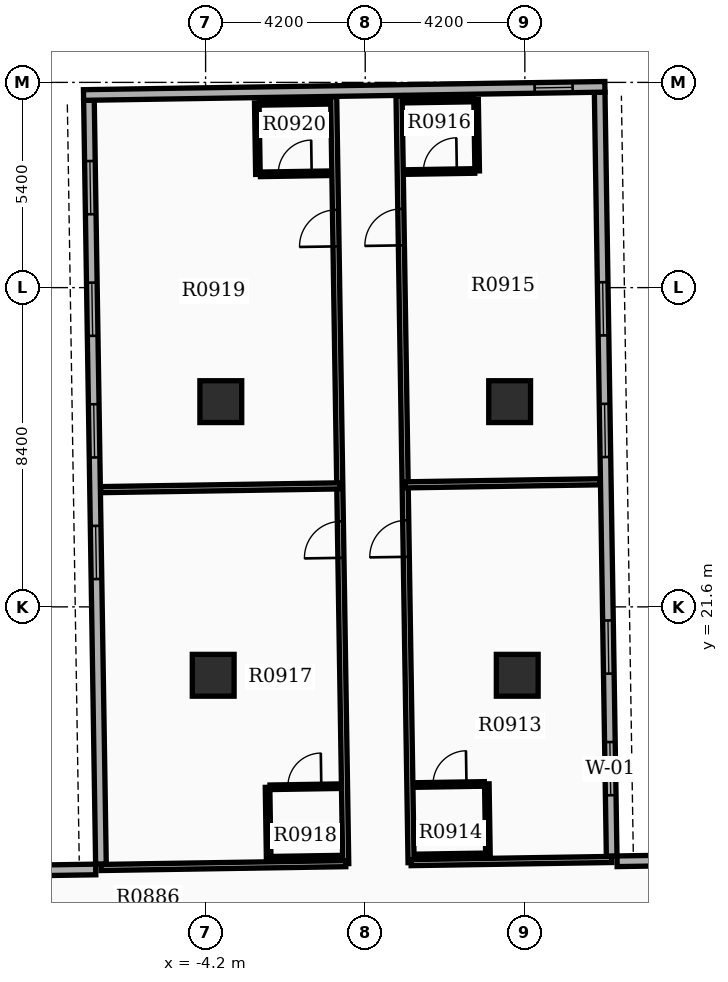
"""IFC4 building model, lengths in metres.
Left out: names, types, materials, properties, quantities, classifications, styles, units other than length and angle.
Written with IfcOpenShell. Run it as: python <this file> out.ifc"""

import sys

from ifc_helpers import new_model, si_unit, direction, frame, frame_2d, origin, origin_2d, place, context, subcontext, project, spatial, rectangle, extrude, element, fill, save


model = new_model("IFC4")
c1 = context("Model", 3, precision=1e-05, world=origin(), true_north=direction((0.0, 1.0)))
c2 = subcontext(c1, "Body", "Model", "MODEL_VIEW")
j1 = project(units=[si_unit("LENGTHUNIT", "METRE"), si_unit("PLANEANGLEUNIT", "RADIAN")], contexts=[c1])
p1 = place(None, origin())
s1 = spatial("IfcSite", under=j1, at=p1, CompositionType="ELEMENT")
p2 = place(p1, origin())
s2 = spatial("IfcBuilding", under=s1, at=p2, CompositionType="ELEMENT")
p3 = place(p2, frame((0.0, 0.0, 60.0)))
s3 = spatial("IfcBuildingStorey", under=s2, at=p3, CompositionType="ELEMENT", Elevation=60.0)
for number, where, z_axis, x_axis in (
    (1, (-4.0, 19.8, 0.0), (0.0, 0.0, 1.0), (1.0, 0.0, 0.0)),
    (2, (4.0, 19.8, 0.0), (0.0, 0.0, 1.0), (1.0, 0.0, 0.0)),
    (3, (-3.8, 27.0, 0.0), (0.0, 0.0, 1.0), (1.0, 0.0, 0.0)),
    (4, (3.8, 27.0, 0.0), (0.0, 0.0, 1.0), (1.0, 0.0, 0.0)),
):
    element("IfcColumn", number, at=place(p3, frame(where, z_axis=z_axis, x_axis=x_axis)), inside=s3, PredefinedType="COLUMN", context=c2, shape_type="SweptSolid", body=[
        extrude(rectangle(XDim=1.1, YDim=1.1, at=origin_2d()), origin(), (0.0, 0.0, 1.0), 3.9),
    ])
p4 = place(p3, frame((6.485, 15.044, 0.0), z_axis=(0.0, 0.0, 1.0), x_axis=(-0.01571739401, 0.999876474133, 0.0)))
e5 = element("IfcWall", 5, at=p4, inside=s3, PredefinedType="STANDARD", context=c2, shape_type="SweptSolid", body=[
    extrude(rectangle(XDim=20.1, YDim=0.28, at=frame_2d((10.05, 0.0))), origin(), (0.0, 0.0, 1.0), 2.91),
])
p5 = place(p4, frame((1.6, 0.0, 0.8)))
e6 = element("IfcOpeningElement", 6, at=p5, cuts=e5, PredefinedType="OPENING", context=c2, shape_type="SweptSolid", body=[
    extrude(rectangle(XDim=1.4, YDim=1.6, at=frame_2d((0.7, 0.8))), frame((0.0, 0.15, 0.0), z_axis=(0.0, -1.0, 0.0), x_axis=(1.0, 0.0, 0.0)), (0.0, 0.0, 1.0), 0.3),
])
p6 = place(p4, frame((4.8, 0.0, 0.8)))
e7 = element("IfcOpeningElement", 7, at=p6, cuts=e5, PredefinedType="OPENING", context=c2, shape_type="SweptSolid", body=[
    extrude(rectangle(XDim=1.4, YDim=1.6, at=frame_2d((0.7, 0.8))), frame((0.0, 0.15, 0.0), z_axis=(0.0, -1.0, 0.0), x_axis=(1.0, 0.0, 0.0)), (0.0, 0.0, 1.0), 0.3),
])
p7 = place(p4, frame((10.5, 0.0, 0.8)))
e8 = element("IfcOpeningElement", 8, at=p7, cuts=e5, PredefinedType="OPENING", context=c2, shape_type="SweptSolid", body=[
    extrude(rectangle(XDim=1.4, YDim=1.6, at=frame_2d((0.7, 0.8))), frame((0.0, 0.15, 0.0), z_axis=(0.0, -1.0, 0.0), x_axis=(1.0, 0.0, 0.0)), (0.0, 0.0, 1.0), 0.3),
])
p8 = place(p4, frame((13.7, 0.0, 0.8)))
e9 = element("IfcOpeningElement", 9, at=p8, cuts=e5, PredefinedType="OPENING", context=c2, shape_type="SweptSolid", body=[
    extrude(rectangle(XDim=1.4, YDim=1.6, at=frame_2d((0.7, 0.8))), frame((0.0, 0.15, 0.0), z_axis=(0.0, -1.0, 0.0), x_axis=(1.0, 0.0, 0.0)), (0.0, 0.0, 1.0), 0.3),
])
p9 = place(p3, frame((-7.27, 34.93, 0.0), z_axis=(0.0, 0.0, 1.0), x_axis=(0.015705059908, -0.999876667941, 0.0)))
e10 = element("IfcWall", 10, at=p9, inside=s3, PredefinedType="STANDARD", context=c2, shape_type="SweptSolid", body=[
    extrude(rectangle(XDim=20.1, YDim=0.28, at=frame_2d((10.05, 0.0))), origin(), (0.0, 0.0, 1.0), 2.91),
])
p10 = place(p9, frame((1.6, 0.0, 0.8)))
e11 = element("IfcOpeningElement", 11, at=p10, cuts=e10, PredefinedType="OPENING", context=c2, shape_type="SweptSolid", body=[
    extrude(rectangle(XDim=1.4, YDim=1.6, at=frame_2d((0.7, 0.8))), frame((0.0, 0.15, 0.0), z_axis=(0.0, -1.0, 0.0), x_axis=(1.0, 0.0, 0.0)), (0.0, 0.0, 1.0), 0.3),
])
p11 = place(p9, frame((4.8, 0.0, 0.8)))
e12 = element("IfcOpeningElement", 12, at=p11, cuts=e10, PredefinedType="OPENING", context=c2, shape_type="SweptSolid", body=[
    extrude(rectangle(XDim=1.4, YDim=1.6, at=frame_2d((0.7, 0.8))), frame((0.0, 0.15, 0.0), z_axis=(0.0, -1.0, 0.0), x_axis=(1.0, 0.0, 0.0)), (0.0, 0.0, 1.0), 0.3),
])
p12 = place(p9, frame((8.0, 0.0, 0.8)))
e13 = element("IfcOpeningElement", 13, at=p12, cuts=e10, PredefinedType="OPENING", context=c2, shape_type="SweptSolid", body=[
    extrude(rectangle(XDim=1.4, YDim=1.6, at=frame_2d((0.7, 0.8))), frame((0.0, 0.15, 0.0), z_axis=(0.0, -1.0, 0.0), x_axis=(1.0, 0.0, 0.0)), (0.0, 0.0, 1.0), 0.3),
])
p13 = place(p9, frame((11.2, 0.0, 0.8)))
e14 = element("IfcOpeningElement", 14, at=p13, cuts=e10, PredefinedType="OPENING", context=c2, shape_type="SweptSolid", body=[
    extrude(rectangle(XDim=1.4, YDim=1.6, at=frame_2d((0.7, 0.8))), frame((0.0, 0.15, 0.0), z_axis=(0.0, -1.0, 0.0), x_axis=(1.0, 0.0, 0.0)), (0.0, 0.0, 1.0), 0.3),
])
p14 = place(p3, frame((6.307, 35.283, 0.0), z_axis=(0.0, 0.0, 1.0), x_axis=(-0.999876549481, -0.015712599986, 0.0)))
e15 = element("IfcWall", 15, at=p14, inside=s3, PredefinedType="STANDARD", context=c2, shape_type="SweptSolid", body=[
    extrude(rectangle(XDim=13.72, YDim=0.28, at=frame_2d((6.86, 0.0))), origin(), (0.0, 0.0, 1.0), 2.91),
])
p15 = place(p14, frame((0.85, 0.0, 0.85)))
e16 = element("IfcOpeningElement", 16, at=p15, cuts=e15, PredefinedType="OPENING", context=c2, shape_type="SweptSolid", body=[
    extrude(rectangle(XDim=1.0, YDim=1.5, at=frame_2d((0.5, 0.75))), frame((0.0, 0.15, 0.0), z_axis=(0.0, -1.0, 0.0), x_axis=(1.0, 0.0, 0.0)), (0.0, 0.0, 1.0), 0.3),
])
p16 = place(p3, frame((12.926, 15.005, 0.0), z_axis=(0.0, 0.0, 1.0), x_axis=(-0.999876823822, -0.015695132501, 0.0)))
e17 = element("IfcWall", 17, at=p16, inside=s3, PredefinedType="STANDARD", context=c2, shape_type="SweptSolid", body=[
    extrude(rectangle(XDim=6.3, YDim=0.28, at=frame_2d((3.15, 0.0))), origin(), (0.0, 0.0, 1.0), 2.91),
])
p17 = place(p3, frame((-13.391, 14.592, 0.0), z_axis=(0.0, 0.0, 1.0), x_axis=(0.999876833368, 0.015694524359, 0.0)))
e18 = element("IfcWall", 18, at=p17, inside=s3, PredefinedType="STANDARD", context=c2, shape_type="SweptSolid", body=[
    extrude(rectangle(XDim=6.3, YDim=0.28, at=frame_2d((3.15, 0.0))), origin(), (0.0, 0.0, 1.0), 2.91),
])
p18 = place(p3, frame((1.207, 14.871, 0.0), z_axis=(0.0, 0.0, 1.0), x_axis=(-0.015713987169, 0.999876527681, 0.0)))
e19 = element("IfcWall", 19, at=p18, inside=s3, PredefinedType="PARTITIONING", context=c2, shape_type="SweptSolid", body=[
    extrude(rectangle(XDim=20.182, YDim=0.16, at=frame_2d((10.091, 0.0))), origin(), (0.0, 0.0, 1.0), 2.9),
])
p19 = place(p18, frame((8.047, 0.0, 0.0)))
e20 = element("IfcOpeningElement", 20, at=p19, cuts=e19, PredefinedType="OPENING", context=c2, shape_type="SweptSolid", body=[
    extrude(rectangle(XDim=0.96, YDim=2.15, at=frame_2d((0.48, 1.075))), frame((0.0, 0.09, 0.0), z_axis=(0.0, -1.0, 0.0), x_axis=(1.0, 0.0, 0.0)), (0.0, 0.0, 1.0), 0.18),
])
p20 = place(p18, frame((16.243, 0.0, 0.0)))
e21 = element("IfcOpeningElement", 21, at=p20, cuts=e19, PredefinedType="OPENING", context=c2, shape_type="SweptSolid", body=[
    extrude(rectangle(XDim=0.96, YDim=2.15, at=frame_2d((0.48, 1.075))), frame((0.0, 0.09, 0.0), z_axis=(0.0, -1.0, 0.0), x_axis=(1.0, 0.0, 0.0)), (0.0, 0.0, 1.0), 0.18),
])
p21 = place(p3, frame((1.207, 14.871, 0.0), z_axis=(0.0, 0.0, 1.0), x_axis=(0.999877138082, 0.015675099418, 0.0)))
e22 = element("IfcWall", 22, at=p21, inside=s3, PredefinedType="PARTITIONING", context=c2, shape_type="SweptSolid", body=[
    extrude(rectangle(XDim=5.28, YDim=0.16, at=frame_2d((2.64, 0.0))), origin(), (0.0, 0.0, 1.0), 2.9),
])
p22 = place(p3, frame((1.05, 24.811, 0.0), z_axis=(0.0, 0.0, 1.0), x_axis=(0.99987677651, 0.01569814626, 0.0)))
e23 = element("IfcWall", 23, at=p22, inside=s3, PredefinedType="PARTITIONING", context=c2, shape_type="SweptSolid", body=[
    extrude(rectangle(XDim=5.132, YDim=0.16, at=frame_2d((2.566, 0.0))), origin(), (0.0, 0.0, 1.0), 2.9),
])
p23 = place(p3, frame((1.314, 16.913, 0.0), z_axis=(0.0, 0.0, 1.0), x_axis=(0.999874722342, 0.015828443418, 0.0)))
e24 = element("IfcWall", 24, at=p23, inside=s3, PredefinedType="PARTITIONING", context=c2, shape_type="SweptSolid", body=[
    extrude(rectangle(XDim=1.82, YDim=0.12, at=frame_2d((0.91, 0.0))), origin(), (0.0, 0.0, 1.0), 2.9),
])
p24 = place(p23, frame((0.47, 0.0, 0.0)))
e25 = element("IfcOpeningElement", 25, at=p24, cuts=e24, PredefinedType="OPENING", context=c2, shape_type="SweptSolid", body=[
    extrude(rectangle(XDim=0.88, YDim=2.1, at=frame_2d((0.44, 1.05))), frame((0.0, 0.07, 0.0), z_axis=(0.0, -1.0, 0.0), x_axis=(1.0, 0.0, 0.0)), (0.0, 0.0, 1.0), 0.14),
])
p25 = place(p3, frame((1.344, 15.033, 0.0), z_axis=(0.0, 0.0, 1.0), x_axis=(0.999876836305, 0.015694337248, 0.0)))
e26 = element("IfcWall", 26, at=p25, inside=s3, PredefinedType="PARTITIONING", context=c2, shape_type="SweptSolid", body=[
    extrude(rectangle(XDim=1.82, YDim=0.12, at=frame_2d((0.91, 0.0))), origin(), (0.0, 0.0, 1.0), 2.9),
])
p26 = place(p3, frame((3.229, 15.062, 0.0), z_axis=(0.0, 0.0, 1.0), x_axis=(-0.01571234584, 0.999876553475, 0.0)))
e27 = element("IfcWall", 27, at=p26, inside=s3, PredefinedType="PARTITIONING", context=c2, shape_type="SweptSolid", body=[
    extrude(rectangle(XDim=1.88, YDim=0.12, at=frame_2d((0.94, 0.0))), origin(), (0.0, 0.0, 1.0), 2.9),
])
p27 = place(p3, frame((1.061, 33.041, 0.0), z_axis=(0.0, 0.0, 1.0), x_axis=(0.999876836305, 0.015694337248, 0.0)))
e28 = element("IfcWall", 28, at=p27, inside=s3, PredefinedType="PARTITIONING", context=c2, shape_type="SweptSolid", body=[
    extrude(rectangle(XDim=1.82, YDim=0.12, at=frame_2d((0.91, 0.0))), origin(), (0.0, 0.0, 1.0), 2.9),
])
p28 = place(p27, frame((0.47, 0.0, 0.0)))
e29 = element("IfcOpeningElement", 29, at=p28, cuts=e28, PredefinedType="OPENING", context=c2, shape_type="SweptSolid", body=[
    extrude(rectangle(XDim=0.88, YDim=2.1, at=frame_2d((0.44, 1.05))), frame((0.0, 0.07, 0.0), z_axis=(0.0, -1.0, 0.0), x_axis=(1.0, 0.0, 0.0)), (0.0, 0.0, 1.0), 0.14),
])
p29 = place(p3, frame((1.031, 34.92, 0.0), z_axis=(0.0, 0.0, 1.0), x_axis=(0.999874722342, 0.015828443418, 0.0)))
e30 = element("IfcWall", 30, at=p29, inside=s3, PredefinedType="PARTITIONING", context=c2, shape_type="SweptSolid", body=[
    extrude(rectangle(XDim=1.82, YDim=0.12, at=frame_2d((0.91, 0.0))), origin(), (0.0, 0.0, 1.0), 2.9),
])
p30 = place(p3, frame((2.946, 33.07, 0.0), z_axis=(0.0, 0.0, 1.0), x_axis=(-0.015582523404, 0.999878585111, 0.0)))
e31 = element("IfcWall", 31, at=p30, inside=s3, PredefinedType="PARTITIONING", context=c2, shape_type="SweptSolid", body=[
    extrude(rectangle(XDim=1.88, YDim=0.12, at=frame_2d((0.94, 0.0))), origin(), (0.0, 0.0, 1.0), 2.9),
])
p31 = place(p3, frame((-0.513, 14.844, 0.0), z_axis=(0.0, 0.0, 1.0), x_axis=(-0.015701893165, 0.999876717676, 0.0)))
e32 = element("IfcWall", 32, at=p31, inside=s3, PredefinedType="PARTITIONING", context=c2, shape_type="SweptSolid", body=[
    extrude(rectangle(XDim=20.182, YDim=0.16, at=frame_2d((10.091, 0.0))), origin(), (0.0, 0.0, 1.0), 2.9),
])
p32 = place(p31, frame((8.047, 0.0, 0.0)))
e33 = element("IfcOpeningElement", 33, at=p32, cuts=e32, PredefinedType="OPENING", context=c2, shape_type="SweptSolid", body=[
    extrude(rectangle(XDim=0.96, YDim=2.15, at=frame_2d((0.48, 1.075))), frame((0.0, 0.09, 0.0), z_axis=(0.0, -1.0, 0.0), x_axis=(1.0, 0.0, 0.0)), (0.0, 0.0, 1.0), 0.18),
])
p33 = place(p31, frame((16.243, 0.0, 0.0)))
e34 = element("IfcOpeningElement", 34, at=p33, cuts=e32, PredefinedType="OPENING", context=c2, shape_type="SweptSolid", body=[
    extrude(rectangle(XDim=0.96, YDim=2.15, at=frame_2d((0.48, 1.075))), frame((0.0, 0.09, 0.0), z_axis=(0.0, -1.0, 0.0), x_axis=(1.0, 0.0, 0.0)), (0.0, 0.0, 1.0), 0.18),
])
p34 = place(p3, frame((-0.513, 14.844, 0.0), z_axis=(0.0, 0.0, 1.0), x_axis=(-0.99987682984, -0.015694749102, 0.0)))
e35 = element("IfcWall", 35, at=p34, inside=s3, PredefinedType="PARTITIONING", context=c2, shape_type="SweptSolid", body=[
    extrude(rectangle(XDim=6.44, YDim=0.16, at=frame_2d((3.22, 0.0))), origin(), (0.0, 0.0, 1.0), 2.9),
])
p35 = place(p3, frame((-0.669, 24.783, 0.0), z_axis=(0.0, 0.0, 1.0), x_axis=(-0.999877126691, -0.015675825961, 0.0)))
e36 = element("IfcWall", 36, at=p35, inside=s3, PredefinedType="PARTITIONING", context=c2, shape_type="SweptSolid", body=[
    extrude(rectangle(XDim=6.292, YDim=0.16, at=frame_2d((3.146, 0.0))), origin(), (0.0, 0.0, 1.0), 2.9),
])
p36 = place(p3, frame((-2.505, 16.853, 0.0), z_axis=(0.0, 0.0, 1.0), x_axis=(0.999876803258, 0.015696442504, 0.0)))
e37 = element("IfcWall", 37, at=p36, inside=s3, PredefinedType="PARTITIONING", context=c2, shape_type="SweptSolid", body=[
    extrude(rectangle(XDim=1.82, YDim=0.12, at=frame_2d((0.91, 0.0))), origin(), (0.0, 0.0, 1.0), 2.9),
])
p37 = place(p36, frame((0.47, 0.0, 0.0)))
e38 = element("IfcOpeningElement", 38, at=p37, cuts=e37, PredefinedType="OPENING", context=c2, shape_type="SweptSolid", body=[
    extrude(rectangle(XDim=0.88, YDim=2.1, at=frame_2d((0.44, 1.05))), frame((0.0, 0.07, 0.0), z_axis=(0.0, -1.0, 0.0), x_axis=(1.0, 0.0, 0.0)), (0.0, 0.0, 1.0), 0.14),
])
p38 = place(p3, frame((-2.476, 14.973, 0.0), z_axis=(0.0, 0.0, 1.0), x_axis=(0.999874722342, 0.015828443418, 0.0)))
e39 = element("IfcWall", 39, at=p38, inside=s3, PredefinedType="PARTITIONING", context=c2, shape_type="SweptSolid", body=[
    extrude(rectangle(XDim=1.82, YDim=0.12, at=frame_2d((0.91, 0.0))), origin(), (0.0, 0.0, 1.0), 2.9),
])
p39 = place(p3, frame((-2.541, 14.972, 0.0), z_axis=(0.0, 0.0, 1.0), x_axis=(-0.01571234584, 0.999876553475, 0.0)))
e40 = element("IfcWall", 40, at=p39, inside=s3, PredefinedType="PARTITIONING", context=c2, shape_type="SweptSolid", body=[
    extrude(rectangle(XDim=1.88, YDim=0.12, at=frame_2d((0.94, 0.0))), origin(), (0.0, 0.0, 1.0), 2.9),
])
p40 = place(p3, frame((-2.758, 32.981, 0.0), z_axis=(0.0, 0.0, 1.0), x_axis=(0.999876803258, 0.015696442504, 0.0)))
e41 = element("IfcWall", 41, at=p40, inside=s3, PredefinedType="PARTITIONING", context=c2, shape_type="SweptSolid", body=[
    extrude(rectangle(XDim=1.82, YDim=0.12, at=frame_2d((0.91, 0.0))), origin(), (0.0, 0.0, 1.0), 2.9),
])
p41 = place(p40, frame((0.47, 0.0, 0.0)))
e42 = element("IfcOpeningElement", 42, at=p41, cuts=e41, PredefinedType="OPENING", context=c2, shape_type="SweptSolid", body=[
    extrude(rectangle(XDim=0.88, YDim=2.1, at=frame_2d((0.44, 1.05))), frame((0.0, 0.07, 0.0), z_axis=(0.0, -1.0, 0.0), x_axis=(1.0, 0.0, 0.0)), (0.0, 0.0, 1.0), 0.14),
])
p42 = place(p3, frame((-2.788, 34.861, 0.0), z_axis=(0.0, 0.0, 1.0), x_axis=(0.999876836305, 0.015694337248, 0.0)))
e43 = element("IfcWall", 43, at=p42, inside=s3, PredefinedType="PARTITIONING", context=c2, shape_type="SweptSolid", body=[
    extrude(rectangle(XDim=1.82, YDim=0.12, at=frame_2d((0.91, 0.0))), origin(), (0.0, 0.0, 1.0), 2.9),
])
p43 = place(p3, frame((-2.823, 32.98, 0.0), z_axis=(0.0, 0.0, 1.0), x_axis=(-0.015582523404, 0.999878585111, 0.0)))
e44 = element("IfcWall", 44, at=p43, inside=s3, PredefinedType="PARTITIONING", context=c2, shape_type="SweptSolid", body=[
    extrude(rectangle(XDim=1.88, YDim=0.12, at=frame_2d((0.94, 0.0))), origin(), (0.0, 0.0, 1.0), 2.9),
])
p44 = place(p5, origin())
e45 = element("IfcWindow", 45, at=p44, inside=s3, PartitioningType="SINGLE_PANEL", PredefinedType="WINDOW", context=c2, shape_type="SweptSolid", body=[
    extrude(rectangle(XDim=1.4, YDim=1.6, at=frame_2d((0.7, 0.8))), frame((0.0, 0.03, 0.0), z_axis=(0.0, -1.0, 0.0), x_axis=(1.0, 0.0, 0.0)), (0.0, 0.0, 1.0), 0.06),
])
fill(e6, e45)
p45 = place(p6, origin())
e46 = element("IfcWindow", 46, at=p45, inside=s3, PartitioningType="SINGLE_PANEL", PredefinedType="WINDOW", context=c2, shape_type="SweptSolid", body=[
    extrude(rectangle(XDim=1.4, YDim=1.6, at=frame_2d((0.7, 0.8))), frame((0.0, 0.03, 0.0), z_axis=(0.0, -1.0, 0.0), x_axis=(1.0, 0.0, 0.0)), (0.0, 0.0, 1.0), 0.06),
])
fill(e7, e46)
p46 = place(p7, origin())
e47 = element("IfcWindow", 47, at=p46, inside=s3, PartitioningType="SINGLE_PANEL", PredefinedType="WINDOW", context=c2, shape_type="SweptSolid", body=[
    extrude(rectangle(XDim=1.4, YDim=1.6, at=frame_2d((0.7, 0.8))), frame((0.0, 0.03, 0.0), z_axis=(0.0, -1.0, 0.0), x_axis=(1.0, 0.0, 0.0)), (0.0, 0.0, 1.0), 0.06),
])
fill(e8, e47)
p47 = place(p8, origin())
e48 = element("IfcWindow", 48, at=p47, inside=s3, PartitioningType="SINGLE_PANEL", PredefinedType="WINDOW", context=c2, shape_type="SweptSolid", body=[
    extrude(rectangle(XDim=1.4, YDim=1.6, at=frame_2d((0.7, 0.8))), frame((0.0, 0.03, 0.0), z_axis=(0.0, -1.0, 0.0), x_axis=(1.0, 0.0, 0.0)), (0.0, 0.0, 1.0), 0.06),
])
fill(e9, e48)
p48 = place(p10, origin())
e49 = element("IfcWindow", 49, at=p48, inside=s3, PartitioningType="SINGLE_PANEL", PredefinedType="WINDOW", context=c2, shape_type="SweptSolid", body=[
    extrude(rectangle(XDim=1.4, YDim=1.6, at=frame_2d((0.7, 0.8))), frame((0.0, 0.03, 0.0), z_axis=(0.0, -1.0, 0.0), x_axis=(1.0, 0.0, 0.0)), (0.0, 0.0, 1.0), 0.06),
])
fill(e11, e49)
p49 = place(p11, origin())
e50 = element("IfcWindow", 50, at=p49, inside=s3, PartitioningType="SINGLE_PANEL", PredefinedType="WINDOW", context=c2, shape_type="SweptSolid", body=[
    extrude(rectangle(XDim=1.4, YDim=1.6, at=frame_2d((0.7, 0.8))), frame((0.0, 0.03, 0.0), z_axis=(0.0, -1.0, 0.0), x_axis=(1.0, 0.0, 0.0)), (0.0, 0.0, 1.0), 0.06),
])
fill(e12, e50)
p50 = place(p12, origin())
e51 = element("IfcWindow", 51, at=p50, inside=s3, PartitioningType="SINGLE_PANEL", PredefinedType="WINDOW", context=c2, shape_type="SweptSolid", body=[
    extrude(rectangle(XDim=1.4, YDim=1.6, at=frame_2d((0.7, 0.8))), frame((0.0, 0.03, 0.0), z_axis=(0.0, -1.0, 0.0), x_axis=(1.0, 0.0, 0.0)), (0.0, 0.0, 1.0), 0.06),
])
fill(e13, e51)
p51 = place(p13, origin())
e52 = element("IfcWindow", 52, at=p51, inside=s3, PartitioningType="SINGLE_PANEL", PredefinedType="WINDOW", context=c2, shape_type="SweptSolid", body=[
    extrude(rectangle(XDim=1.4, YDim=1.6, at=frame_2d((0.7, 0.8))), frame((0.0, 0.03, 0.0), z_axis=(0.0, -1.0, 0.0), x_axis=(1.0, 0.0, 0.0)), (0.0, 0.0, 1.0), 0.06),
])
fill(e14, e52)
p52 = place(p15, origin())
e53 = element("IfcWindow", 53, at=p52, inside=s3, PartitioningType="SINGLE_PANEL", PredefinedType="WINDOW", context=c2, shape_type="SweptSolid", body=[
    extrude(rectangle(XDim=1.0, YDim=1.5, at=frame_2d((0.5, 0.75))), frame((0.0, 0.03, 0.0), z_axis=(0.0, -1.0, 0.0), x_axis=(1.0, 0.0, 0.0)), (0.0, 0.0, 1.0), 0.06),
])
fill(e16, e53)
p53 = place(p19, origin())
e54 = element("IfcDoor", 54, at=p53, inside=s3, OperationType="SINGLE_SWING_LEFT", PredefinedType="DOOR", context=c2, shape_type="SweptSolid", body=[
    extrude(rectangle(XDim=0.96, YDim=2.15, at=frame_2d((0.48, 1.075))), frame((0.0, 0.025, 0.0), z_axis=(0.0, -1.0, 0.0), x_axis=(1.0, 0.0, 0.0)), (0.0, 0.0, 1.0), 0.05),
])
fill(e20, e54)
p54 = place(p24, origin())
e55 = element("IfcDoor", 55, at=p54, inside=s3, OperationType="SINGLE_SWING_RIGHT", PredefinedType="DOOR", context=c2, shape_type="SweptSolid", body=[
    extrude(rectangle(XDim=0.88, YDim=2.1, at=frame_2d((0.44, 1.05))), frame((0.0, 0.025, 0.0), z_axis=(0.0, -1.0, 0.0), x_axis=(1.0, 0.0, 0.0)), (0.0, 0.0, 1.0), 0.05),
])
fill(e25, e55)
p55 = place(p20, origin())
e56 = element("IfcDoor", 56, at=p55, inside=s3, OperationType="SINGLE_SWING_LEFT", PredefinedType="DOOR", context=c2, shape_type="SweptSolid", body=[
    extrude(rectangle(XDim=0.96, YDim=2.15, at=frame_2d((0.48, 1.075))), frame((0.0, 0.025, 0.0), z_axis=(0.0, -1.0, 0.0), x_axis=(1.0, 0.0, 0.0)), (0.0, 0.0, 1.0), 0.05),
])
fill(e21, e56)
p56 = place(p28, origin())
e57 = element("IfcDoor", 57, at=p56, inside=s3, OperationType="SINGLE_SWING_RIGHT", PredefinedType="DOOR", context=c2, shape_type="SweptSolid", body=[
    extrude(rectangle(XDim=0.88, YDim=2.1, at=frame_2d((0.44, 1.05))), frame((0.0, 0.025, 0.0), z_axis=(0.0, -1.0, 0.0), x_axis=(1.0, 0.0, 0.0)), (0.0, 0.0, 1.0), 0.05),
])
fill(e29, e57)
p57 = place(p32, origin())
e58 = element("IfcDoor", 58, at=p57, inside=s3, OperationType="SINGLE_SWING_LEFT", PredefinedType="DOOR", context=c2, shape_type="SweptSolid", body=[
    extrude(rectangle(XDim=0.96, YDim=2.15, at=frame_2d((0.48, 1.075))), frame((0.0, 0.025, 0.0), z_axis=(0.0, -1.0, 0.0), x_axis=(1.0, 0.0, 0.0)), (0.0, 0.0, 1.0), 0.05),
])
fill(e33, e58)
p58 = place(p37, origin())
e59 = element("IfcDoor", 59, at=p58, inside=s3, OperationType="SINGLE_SWING_RIGHT", PredefinedType="DOOR", context=c2, shape_type="SweptSolid", body=[
    extrude(rectangle(XDim=0.88, YDim=2.1, at=frame_2d((0.44, 1.05))), frame((0.0, 0.025, 0.0), z_axis=(0.0, -1.0, 0.0), x_axis=(1.0, 0.0, 0.0)), (0.0, 0.0, 1.0), 0.05),
])
fill(e38, e59)
p59 = place(p33, origin())
e60 = element("IfcDoor", 60, at=p59, inside=s3, OperationType="SINGLE_SWING_LEFT", PredefinedType="DOOR", context=c2, shape_type="SweptSolid", body=[
    extrude(rectangle(XDim=0.96, YDim=2.15, at=frame_2d((0.48, 1.075))), frame((0.0, 0.025, 0.0), z_axis=(0.0, -1.0, 0.0), x_axis=(1.0, 0.0, 0.0)), (0.0, 0.0, 1.0), 0.05),
])
fill(e34, e60)
p60 = place(p41, origin())
e61 = element("IfcDoor", 61, at=p60, inside=s3, OperationType="SINGLE_SWING_RIGHT", PredefinedType="DOOR", context=c2, shape_type="SweptSolid", body=[
    extrude(rectangle(XDim=0.88, YDim=2.1, at=frame_2d((0.44, 1.05))), frame((0.0, 0.025, 0.0), z_axis=(0.0, -1.0, 0.0), x_axis=(1.0, 0.0, 0.0)), (0.0, 0.0, 1.0), 0.05),
])
fill(e42, e61)
save(model, sys.argv[1])
